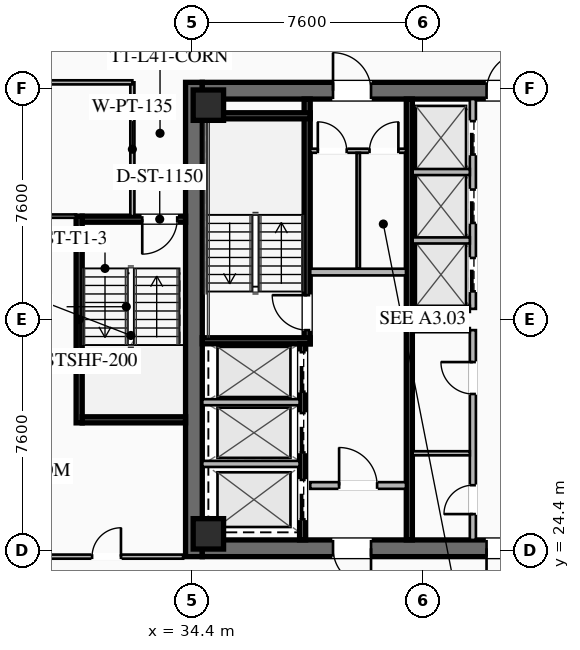
"""IFC4 building model, lengths in metres.
Left out: names, types, materials, properties, quantities, classifications, styles, units other than length and angle.
Written with IfcOpenShell. Run it as: python <this file> out.ifc"""

import sys

from ifc_helpers import new_model, si_unit, direction, frame, frame_2d, origin, origin_2d, place, context, subcontext, project, spatial, rectangle, hollow_rectangle, extrude, element, fill, save


model = new_model("IFC4")
c1 = context("Model", 3, precision=1e-05, world=origin(), true_north=direction((0.0, 1.0)))
c2 = subcontext(c1, "Body", "Model", "MODEL_VIEW")
j1 = project(units=[si_unit("LENGTHUNIT", "METRE"), si_unit("PLANEANGLEUNIT", "RADIAN")], contexts=[c1])
p1 = place(None, origin())
s1 = spatial("IfcSite", under=j1, at=p1, CompositionType="ELEMENT")
p2 = place(p1, origin())
s2 = spatial("IfcBuilding", under=s1, at=p2, CompositionType="ELEMENT")
p3 = place(p2, frame((0.0, 0.0, 153.45)))
s3 = spatial("IfcBuildingStorey", under=s2, at=p3, CompositionType="ELEMENT", Elevation=153.45)
p4 = place(p3, frame((34.475, 24.2, 0.0), z_axis=(0.0, 0.0, 1.0), x_axis=(0.0, 1.0, 0.0)))
e1 = element("IfcWall", 1, at=p4, inside=s3, PredefinedType="SHEAR", context=c2, shape_type="SweptSolid", body=[
    extrude(rectangle(XDim=15.6, YDim=0.55, at=frame_2d((7.8, 0.0))), origin(), (0.0, 0.0, 1.0), 3.55),
])
p5 = place(p3, frame((49.25, 24.475, 0.0), z_axis=(0.0, 0.0, 1.0), x_axis=(-1.0, 0.0, 0.0)))
e2 = element("IfcWall", 2, at=p5, inside=s3, PredefinedType="SHEAR", context=c2, shape_type="SweptSolid", body=[
    extrude(rectangle(XDim=14.5, YDim=0.55, at=frame_2d((7.25, 0.0))), origin(), (0.0, 0.0, 1.0), 3.55),
])
p6 = place(p5, frame((8.95, 0.0, 0.0)))
e3 = element("IfcOpeningElement", 3, at=p6, cuts=e2, PredefinedType="OPENING", context=c2, shape_type="SweptSolid", body=[
    extrude(rectangle(XDim=1.25, YDim=2.25, at=frame_2d((0.625, 1.125))), frame((0.0, 0.285, 0.0), z_axis=(0.0, -1.0, 0.0), x_axis=(1.0, 0.0, 0.0)), (0.0, 0.0, 1.0), 0.57),
])
p7 = place(p5, frame((3.9, 0.0, 0.0)))
e4 = element("IfcOpeningElement", 4, at=p7, cuts=e2, PredefinedType="OPENING", context=c2, shape_type="SweptSolid", body=[
    extrude(rectangle(XDim=1.25, YDim=2.25, at=frame_2d((0.625, 1.125))), frame((0.0, 0.285, 0.0), z_axis=(0.0, -1.0, 0.0), x_axis=(1.0, 0.0, 0.0)), (0.0, 0.0, 1.0), 0.57),
])
p8 = place(p3, frame((34.75, 39.525, 0.0), z_axis=(0.0, 0.0, 1.0), x_axis=(1.0, 0.0, 0.0)))
e5 = element("IfcWall", 5, at=p8, inside=s3, PredefinedType="SHEAR", context=c2, shape_type="SweptSolid", body=[
    extrude(rectangle(XDim=14.5, YDim=0.55, at=frame_2d((7.25, 0.0))), origin(), (0.0, 0.0, 1.0), 3.55),
])
p9 = place(p8, frame((4.3, 0.0, 0.0)))
e6 = element("IfcOpeningElement", 6, at=p9, cuts=e5, PredefinedType="OPENING", context=c2, shape_type="SweptSolid", body=[
    extrude(rectangle(XDim=1.25, YDim=2.25, at=frame_2d((0.625, 1.125))), frame((0.0, 0.285, 0.0), z_axis=(0.0, -1.0, 0.0), x_axis=(1.0, 0.0, 0.0)), (0.0, 0.0, 1.0), 0.57),
])
p10 = place(p8, frame((9.35, 0.0, 0.0)))
e7 = element("IfcOpeningElement", 7, at=p10, cuts=e5, PredefinedType="OPENING", context=c2, shape_type="SweptSolid", body=[
    extrude(rectangle(XDim=1.25, YDim=2.25, at=frame_2d((0.625, 1.125))), frame((0.0, 0.285, 0.0), z_axis=(0.0, -1.0, 0.0), x_axis=(1.0, 0.0, 0.0)), (0.0, 0.0, 1.0), 0.57),
])
for number, where, z_axis, x_axis in (
    (8, (34.95, 24.95, 0.0), (0.0, 0.0, 1.0), (1.0, 0.0, 0.0)),
    (9, (34.95, 39.05, 0.0), (0.0, 0.0, 1.0), (1.0, 0.0, 0.0)),
):
    element("IfcColumn", number, at=place(p3, frame(where, z_axis=z_axis, x_axis=x_axis)), inside=s3, PredefinedType="COLUMN", context=c2, shape_type="SweptSolid", body=[
        extrude(hollow_rectangle(XDim=1.0, YDim=1.0, WallThickness=0.04, at=origin_2d()), origin(), (0.0, 0.0, 1.0), 3.37),
    ])
p11 = place(p3, frame((38.2, 31.2, 0.0), z_axis=(0.0, 0.0, 1.0), x_axis=(0.0, 1.0, 0.0)))
e10 = element("IfcWall", 10, at=p11, inside=s3, PredefinedType="SHEAR", context=c2, shape_type="SweptSolid", body=[
    extrude(rectangle(XDim=8.05, YDim=0.2, at=frame_2d((4.025, 0.0))), origin(), (0.0, 0.0, 1.0), 3.37),
])
p12 = place(p11, frame((0.45, 0.0, 0.0)))
e11 = element("IfcOpeningElement", 11, at=p12, cuts=e10, PredefinedType="OPENING", context=c2, shape_type="SweptSolid", body=[
    extrude(rectangle(XDim=1.15, YDim=2.2, at=frame_2d((0.575, 1.1))), frame((0.0, 0.11, 0.0), z_axis=(0.0, -1.0, 0.0), x_axis=(1.0, 0.0, 0.0)), (0.0, 0.0, 1.0), 0.22),
])
for number, where, z_axis, x_axis in (
    (12, (34.75, 31.3, 0.0), (0.0, 0.0, 1.0), (1.0, 0.0, 0.0)),
    (13, (34.75, 38.7, 0.0), (0.0, 0.0, 1.0), (1.0, 0.0, 0.0)),
):
    element("IfcWall", number, at=place(p3, frame(where, z_axis=z_axis, x_axis=x_axis)), inside=s3, PredefinedType="SHEAR", context=c2, shape_type="SweptSolid", body=[
        extrude(rectangle(XDim=3.55, YDim=0.2, at=frame_2d((1.775, 0.0))), origin(), (0.0, 0.0, 1.0), 3.37),
    ])
p13 = place(p3, frame((41.56, 24.75, 0.0), z_axis=(0.0, 0.0, 1.0), x_axis=(0.0, 1.0, 0.0)))
e14 = element("IfcWall", 14, at=p13, inside=s3, PredefinedType="SHEAR", context=c2, shape_type="SweptSolid", body=[
    extrude(rectangle(XDim=14.5, YDim=0.2, at=frame_2d((7.25, 0.0))), origin(), (0.0, 0.0, 1.0), 3.37),
])
p14 = place(p3, frame((38.3, 33.56, 0.0), z_axis=(0.0, 0.0, 1.0), x_axis=(1.0, 0.0, 0.0)))
e15 = element("IfcWall", 15, at=p14, inside=s3, PredefinedType="SOLIDWALL", context=c2, shape_type="SweptSolid", body=[
    extrude(rectangle(XDim=3.15, YDim=0.22, at=frame_2d((1.575, 0.0))), origin(), (0.0, 0.0, 1.0), 2.513),
])
p15 = place(p3, frame((38.3, 26.54, 0.0), z_axis=(0.0, 0.0, 1.0), x_axis=(1.0, 0.0, 0.0)))
e16 = element("IfcWall", 16, at=p15, inside=s3, PredefinedType="SOLIDWALL", context=c2, shape_type="SweptSolid", body=[
    extrude(rectangle(XDim=3.15, YDim=0.22, at=frame_2d((1.575, 0.0))), origin(), (0.0, 0.0, 1.0), 2.513),
])
p16 = place(p15, frame((0.95, 0.0, 0.0)))
e17 = element("IfcOpeningElement", 17, at=p16, cuts=e16, PredefinedType="OPENING", context=c2, shape_type="SweptSolid", body=[
    extrude(rectangle(XDim=1.25, YDim=2.25, at=frame_2d((0.625, 1.125))), frame((0.0, 0.12, 0.0), z_axis=(0.0, -1.0, 0.0), x_axis=(1.0, 0.0, 0.0)), (0.0, 0.0, 1.0), 0.24),
])
p17 = place(p3, frame((38.05, 24.75, 0.0), z_axis=(0.0, 0.0, 1.0), x_axis=(0.0, 1.0, 0.0)))
e18 = element("IfcWall", 18, at=p17, inside=s3, PredefinedType="SHEAR", context=c2, shape_type="SweptSolid", body=[
    extrude(rectangle(XDim=6.45, YDim=0.2, at=frame_2d((3.225, 0.0))), origin(), (0.0, 0.0, 1.0), 3.37),
])
p18 = place(p17, frame((4.875, 0.0, 0.0)))
e19 = element("IfcOpeningElement", 19, at=p18, cuts=e18, PredefinedType="OPENING", context=c2, shape_type="SweptSolid", body=[
    extrude(rectangle(XDim=1.3, YDim=2.25, at=frame_2d((0.65, 1.125))), frame((0.0, 0.11, 0.0), z_axis=(0.0, -1.0, 0.0), x_axis=(1.0, 0.0, 0.0)), (0.0, 0.0, 1.0), 0.22),
])
p19 = place(p17, frame((2.875, 0.0, 0.0)))
e20 = element("IfcOpeningElement", 20, at=p19, cuts=e18, PredefinedType="OPENING", context=c2, shape_type="SweptSolid", body=[
    extrude(rectangle(XDim=1.3, YDim=2.25, at=frame_2d((0.65, 1.125))), frame((0.0, 0.11, 0.0), z_axis=(0.0, -1.0, 0.0), x_axis=(1.0, 0.0, 0.0)), (0.0, 0.0, 1.0), 0.22),
])
p20 = place(p17, frame((0.675, 0.0, 0.0)))
e21 = element("IfcOpeningElement", 21, at=p20, cuts=e18, PredefinedType="OPENING", context=c2, shape_type="SweptSolid", body=[
    extrude(rectangle(XDim=1.3, YDim=2.25, at=frame_2d((0.65, 1.125))), frame((0.0, 0.11, 0.0), z_axis=(0.0, -1.0, 0.0), x_axis=(1.0, 0.0, 0.0)), (0.0, 0.0, 1.0), 0.22),
])
for number, where, z_axis, x_axis in (
    (22, (34.75, 27.25, 0.0), (0.0, 0.0, 1.0), (1.0, 0.0, 0.0)),
    (23, (34.75, 29.28, 0.0), (0.0, 0.0, 1.0), (1.0, 0.0, 0.0)),
):
    element("IfcWall", number, at=place(p3, frame(where, z_axis=z_axis, x_axis=x_axis)), inside=s3, PredefinedType="SOLIDWALL", context=c2, shape_type="SweptSolid", body=[
        extrude(rectangle(XDim=3.2, YDim=0.2, at=frame_2d((1.6, 0.0))), origin(), (0.0, 0.0, 1.0), 3.37),
    ])
p21 = place(p3, frame((38.3, 37.55, 0.0), z_axis=(0.0, 0.0, 1.0), x_axis=(1.0, 0.0, 0.0)))
e24 = element("IfcWall", 24, at=p21, inside=s3, PredefinedType="PARTITIONING", context=c2, shape_type="SweptSolid", body=[
    extrude(rectangle(XDim=3.15, YDim=0.135, at=frame_2d((1.575, 0.0))), origin(), (0.0, 0.0, 1.0), 2.513),
])
p22 = place(p21, frame((0.25, 0.0, 0.0)))
e25 = element("IfcOpeningElement", 25, at=p22, cuts=e24, PredefinedType="OPENING", context=c2, shape_type="SweptSolid", body=[
    extrude(rectangle(XDim=0.95, YDim=2.05, at=frame_2d((0.475, 1.025))), frame((0.0, 0.077, 0.0), z_axis=(0.0, -1.0, 0.0), x_axis=(1.0, 0.0, 0.0)), (0.0, 0.0, 1.0), 0.155),
])
p23 = place(p21, frame((1.95, 0.0, 0.0)))
e26 = element("IfcOpeningElement", 26, at=p23, cuts=e24, PredefinedType="OPENING", context=c2, shape_type="SweptSolid", body=[
    extrude(rectangle(XDim=0.95, YDim=2.05, at=frame_2d((0.475, 1.025))), frame((0.0, 0.077, 0.0), z_axis=(0.0, -1.0, 0.0), x_axis=(1.0, 0.0, 0.0)), (0.0, 0.0, 1.0), 0.155),
])
p24 = place(p3, frame((39.88, 33.68, 0.0), z_axis=(0.0, 0.0, 1.0), x_axis=(0.0, 1.0, 0.0)))
e27 = element("IfcWall", 27, at=p24, inside=s3, PredefinedType="PARTITIONING", context=c2, shape_type="SweptSolid", body=[
    extrude(rectangle(XDim=3.8, YDim=0.11, at=frame_2d((1.9, 0.0))), origin(), (0.0, 0.0, 1.0), 2.513),
])
p25 = place(p3, frame((43.65, 24.75, 0.0), z_axis=(0.0, 0.0, 1.0), x_axis=(0.0, 1.0, 0.0)))
e28 = element("IfcWall", 28, at=p25, inside=s3, PredefinedType="SOLIDWALL", context=c2, shape_type="SweptSolid", body=[
    extrude(rectangle(XDim=6.9, YDim=0.2, at=frame_2d((3.45, 0.0))), origin(), (0.0, 0.0, 1.0), 2.513),
])
p26 = place(p25, frame((0.85, 0.0, 0.0)))
e29 = element("IfcOpeningElement", 29, at=p26, cuts=e28, PredefinedType="OPENING", context=c2, shape_type="SweptSolid", body=[
    extrude(rectangle(XDim=0.95, YDim=2.05, at=frame_2d((0.475, 1.025))), frame((0.0, 0.11, 0.0), z_axis=(0.0, -1.0, 0.0), x_axis=(1.0, 0.0, 0.0)), (0.0, 0.0, 1.0), 0.22),
])
p27 = place(p25, frame((4.8, 0.0, 0.0)))
e30 = element("IfcOpeningElement", 30, at=p27, cuts=e28, PredefinedType="OPENING", context=c2, shape_type="SweptSolid", body=[
    extrude(rectangle(XDim=1.05, YDim=2.2, at=frame_2d((0.525, 1.1))), frame((0.0, 0.11, 0.0), z_axis=(0.0, -1.0, 0.0), x_axis=(1.0, 0.0, 0.0)), (0.0, 0.0, 1.0), 0.22),
])
for number, where, z_axis, x_axis in (
    (31, (41.67, 31.65, 0.0), (0.0, 0.0, 1.0), (1.0, 0.0, 0.0)),
    (32, (41.67, 27.6, 0.0), (0.0, 0.0, 1.0), (1.0, 0.0, 0.0)),
):
    element("IfcWall", number, at=place(p3, frame(where, z_axis=z_axis, x_axis=x_axis)), inside=s3, PredefinedType="PARTITIONING", context=c2, shape_type="SweptSolid", body=[
        extrude(rectangle(XDim=1.88, YDim=0.135, at=frame_2d((0.94, 0.0))), origin(), (0.0, 0.0, 1.0), 2.513),
    ])
p28 = place(p3, frame((43.65, 32.35, 0.0), z_axis=(0.0, 0.0, 1.0), x_axis=(0.0, 1.0, 0.0)))
e33 = element("IfcWall", 33, at=p28, inside=s3, PredefinedType="SOLIDWALL", context=c2, shape_type="SweptSolid", body=[
    extrude(rectangle(XDim=6.9, YDim=0.2, at=frame_2d((3.45, 0.0))), origin(), (0.0, 0.0, 1.0), 3.37),
])
p29 = place(p28, frame((0.575, 0.0, 0.0)))
e34 = element("IfcOpeningElement", 34, at=p29, cuts=e33, PredefinedType="OPENING", context=c2, shape_type="SweptSolid", body=[
    extrude(rectangle(XDim=1.1, YDim=2.2, at=frame_2d((0.55, 1.1))), frame((0.0, 0.11, 0.0), z_axis=(0.0, -1.0, 0.0), x_axis=(1.0, 0.0, 0.0)), (0.0, 0.0, 1.0), 0.22),
])
p30 = place(p28, frame((2.825, 0.0, 0.0)))
e35 = element("IfcOpeningElement", 35, at=p30, cuts=e33, PredefinedType="OPENING", context=c2, shape_type="SweptSolid", body=[
    extrude(rectangle(XDim=1.1, YDim=2.2, at=frame_2d((0.55, 1.1))), frame((0.0, 0.11, 0.0), z_axis=(0.0, -1.0, 0.0), x_axis=(1.0, 0.0, 0.0)), (0.0, 0.0, 1.0), 0.22),
])
p31 = place(p28, frame((5.075, 0.0, 0.0)))
e36 = element("IfcOpeningElement", 36, at=p31, cuts=e33, PredefinedType="OPENING", context=c2, shape_type="SweptSolid", body=[
    extrude(rectangle(XDim=1.1, YDim=2.2, at=frame_2d((0.55, 1.1))), frame((0.0, 0.11, 0.0), z_axis=(0.0, -1.0, 0.0), x_axis=(1.0, 0.0, 0.0)), (0.0, 0.0, 1.0), 0.22),
])
for number, where, z_axis, x_axis in (
    (37, (41.67, 32.35, 0.0), (0.0, 0.0, 1.0), (1.0, 0.0, 0.0)),
    (38, (41.67, 34.6, 0.0), (0.0, 0.0, 1.0), (1.0, 0.0, 0.0)),
    (39, (41.67, 36.85, 0.0), (0.0, 0.0, 1.0), (1.0, 0.0, 0.0)),
):
    element("IfcWall", number, at=place(p3, frame(where, z_axis=z_axis, x_axis=x_axis)), inside=s3, PredefinedType="SOLIDWALL", context=c2, shape_type="SweptSolid", body=[
        extrude(rectangle(XDim=1.88, YDim=0.2, at=frame_2d((0.94, 0.0))), origin(), (0.0, 0.0, 1.0), 3.37),
    ])
p32 = place(p3, frame((30.7, 28.6, 0.0), z_axis=(0.0, 0.0, 1.0), x_axis=(0.0, 1.0, 0.0)))
e40 = element("IfcWall", 40, at=p32, inside=s3, PredefinedType="SHEAR", context=c2, shape_type="SweptSolid", body=[
    extrude(rectangle(XDim=6.8, YDim=0.2, at=frame_2d((3.4, 0.0))), origin(), (0.0, 0.0, 1.0), 3.37),
])
p33 = place(p3, frame((34.2, 35.3, 0.0), z_axis=(0.0, 0.0, 1.0), x_axis=(-1.0, 0.0, 0.0)))
e41 = element("IfcWall", 41, at=p33, inside=s3, PredefinedType="SHEAR", context=c2, shape_type="SweptSolid", body=[
    extrude(rectangle(XDim=3.4, YDim=0.2, at=frame_2d((1.7, 0.0))), origin(), (0.0, 0.0, 1.0), 3.37),
])
p34 = place(p33, frame((0.275, 0.0, 0.0)))
e42 = element("IfcOpeningElement", 42, at=p34, cuts=e41, PredefinedType="OPENING", context=c2, shape_type="SweptSolid", body=[
    extrude(rectangle(XDim=1.15, YDim=2.2, at=frame_2d((0.575, 1.1))), frame((0.0, 0.11, 0.0), z_axis=(0.0, -1.0, 0.0), x_axis=(1.0, 0.0, 0.0)), (0.0, 0.0, 1.0), 0.22),
])
p35 = place(p3, frame((30.8, 28.7, 0.0), z_axis=(0.0, 0.0, 1.0), x_axis=(1.0, 0.0, 0.0)))
e43 = element("IfcWall", 43, at=p35, inside=s3, PredefinedType="SHEAR", context=c2, shape_type="SweptSolid", body=[
    extrude(rectangle(XDim=3.4, YDim=0.2, at=frame_2d((1.7, 0.0))), origin(), (0.0, 0.0, 1.0), 3.37),
])
p36 = place(p3, frame((32.45, 35.4, 0.0), z_axis=(0.0, 0.0, 1.0), x_axis=(0.0, 1.0, 0.0)))
e44 = element("IfcWall", 44, at=p36, inside=s3, PredefinedType="PARTITIONING", context=c2, shape_type="SweptSolid", body=[
    extrude(rectangle(XDim=4.4, YDim=0.135, at=frame_2d((2.2, 0.0))), origin(), (0.0, 0.0, 1.0), 2.513),
])
p37 = place(p3, frame((32.45, 39.8, 0.0), z_axis=(0.0, 0.0, 1.0), x_axis=(-1.0, 0.0, 0.0)))
e45 = element("IfcWall", 45, at=p37, inside=s3, PredefinedType="PARTITIONING", context=c2, shape_type="SweptSolid", body=[
    extrude(rectangle(XDim=9.73, YDim=0.135, at=frame_2d((4.865, 0.0))), origin(), (0.0, 0.0, 1.0), 2.513),
])
p38 = place(p37, frame((4.04, 0.0, 0.0)))
e46 = element("IfcOpeningElement", 46, at=p38, cuts=e45, PredefinedType="OPENING", context=c2, shape_type="SweptSolid", body=[
    extrude(rectangle(XDim=0.95, YDim=2.05, at=frame_2d((0.475, 1.025))), frame((0.0, 0.077, 0.0), z_axis=(0.0, -1.0, 0.0), x_axis=(1.0, 0.0, 0.0)), (0.0, 0.0, 1.0), 0.155),
])
p39 = place(p3, frame((22.72, 24.2, 0.0), z_axis=(0.0, 0.0, 1.0), x_axis=(1.0, 0.0, 0.0)))
e47 = element("IfcWall", 47, at=p39, inside=s3, PredefinedType="PARTITIONING", context=c2, shape_type="SweptSolid", body=[
    extrude(rectangle(XDim=11.4, YDim=0.135, at=frame_2d((5.7, 0.0))), origin(), (0.0, 0.0, 1.0), 2.513),
])
p40 = place(p39, frame((8.405, 0.0, 0.0)))
e48 = element("IfcOpeningElement", 48, at=p40, cuts=e47, PredefinedType="OPENING", context=c2, shape_type="SweptSolid", body=[
    extrude(rectangle(XDim=0.95, YDim=2.05, at=frame_2d((0.475, 1.025))), frame((0.0, 0.077, 0.0), z_axis=(0.0, -1.0, 0.0), x_axis=(1.0, 0.0, 0.0)), (0.0, 0.0, 1.0), 0.155),
])
p41 = place(p3, frame((30.6, 35.4, 0.0), z_axis=(0.0, 0.0, 1.0), x_axis=(-1.0, 0.0, 0.0)))
e49 = element("IfcWall", 49, at=p41, inside=s3, PredefinedType="PARTITIONING", context=c2, shape_type="SweptSolid", body=[
    extrude(rectangle(XDim=7.88, YDim=0.11, at=frame_2d((3.94, 0.0))), origin(), (0.0, 0.0, 1.0), 2.513),
])
p42 = place(p9, origin())
e50 = element("IfcDoor", 50, at=p42, inside=s3, OperationType="SINGLE_SWING_LEFT", PredefinedType="DOOR", context=c2, shape_type="SweptSolid", body=[
    extrude(rectangle(XDim=1.25, YDim=2.25, at=frame_2d((0.625, 1.125))), frame((0.0, 0.025, 0.0), z_axis=(0.0, -1.0, 0.0), x_axis=(1.0, 0.0, 0.0)), (0.0, 0.0, 1.0), 0.05),
])
fill(e6, e50)
p43 = place(p10, origin())
e51 = element("IfcDoor", 51, at=p43, inside=s3, OperationType="SINGLE_SWING_RIGHT", PredefinedType="DOOR", context=c2, shape_type="SweptSolid", body=[
    extrude(rectangle(XDim=1.25, YDim=2.25, at=frame_2d((0.625, 1.125))), frame((0.0, 0.025, 0.0), z_axis=(0.0, -1.0, 0.0), x_axis=(1.0, 0.0, 0.0)), (0.0, 0.0, 1.0), 0.05),
])
fill(e7, e51)
p44 = place(p6, origin())
e52 = element("IfcDoor", 52, at=p44, inside=s3, OperationType="SINGLE_SWING_LEFT", PredefinedType="DOOR", context=c2, shape_type="SweptSolid", body=[
    extrude(rectangle(XDim=1.25, YDim=2.25, at=frame_2d((0.625, 1.125))), frame((0.0, 0.025, 0.0), z_axis=(0.0, -1.0, 0.0), x_axis=(1.0, 0.0, 0.0)), (0.0, 0.0, 1.0), 0.05),
])
fill(e3, e52)
p45 = place(p7, origin())
e53 = element("IfcDoor", 53, at=p45, inside=s3, OperationType="SINGLE_SWING_RIGHT", PredefinedType="DOOR", context=c2, shape_type="SweptSolid", body=[
    extrude(rectangle(XDim=1.25, YDim=2.25, at=frame_2d((0.625, 1.125))), frame((0.0, 0.025, 0.0), z_axis=(0.0, -1.0, 0.0), x_axis=(1.0, 0.0, 0.0)), (0.0, 0.0, 1.0), 0.05),
])
fill(e4, e53)
p46 = place(p12, origin())
e54 = element("IfcDoor", 54, at=p46, inside=s3, OperationType="SINGLE_SWING_RIGHT", PredefinedType="DOOR", context=c2, shape_type="SweptSolid", body=[
    extrude(rectangle(XDim=1.15, YDim=2.2, at=frame_2d((0.575, 1.1))), frame((0.0, 0.025, 0.0), z_axis=(0.0, -1.0, 0.0), x_axis=(1.0, 0.0, 0.0)), (0.0, 0.0, 1.0), 0.05),
])
fill(e11, e54)
p47 = place(p16, origin())
e55 = element("IfcDoor", 55, at=p47, inside=s3, OperationType="SINGLE_SWING_LEFT", PredefinedType="DOOR", context=c2, shape_type="SweptSolid", body=[
    extrude(rectangle(XDim=1.25, YDim=2.25, at=frame_2d((0.625, 1.125))), frame((0.0, 0.025, 0.0), z_axis=(0.0, -1.0, 0.0), x_axis=(1.0, 0.0, 0.0)), (0.0, 0.0, 1.0), 0.05),
])
fill(e17, e55)
p48 = place(p22, origin())
e56 = element("IfcDoor", 56, at=p48, inside=s3, OperationType="SINGLE_SWING_LEFT", PredefinedType="DOOR", context=c2, shape_type="SweptSolid", body=[
    extrude(rectangle(XDim=0.95, YDim=2.05, at=frame_2d((0.475, 1.025))), frame((0.0, 0.025, 0.0), z_axis=(0.0, -1.0, 0.0), x_axis=(1.0, 0.0, 0.0)), (0.0, 0.0, 1.0), 0.05),
])
fill(e25, e56)
p49 = place(p23, origin())
e57 = element("IfcDoor", 57, at=p49, inside=s3, OperationType="SINGLE_SWING_RIGHT", PredefinedType="DOOR", context=c2, shape_type="SweptSolid", body=[
    extrude(rectangle(XDim=0.95, YDim=2.05, at=frame_2d((0.475, 1.025))), frame((0.0, 0.025, 0.0), z_axis=(0.0, -1.0, 0.0), x_axis=(1.0, 0.0, 0.0)), (0.0, 0.0, 1.0), 0.05),
])
fill(e26, e57)
p50 = place(p26, origin())
e58 = element("IfcDoor", 58, at=p50, inside=s3, OperationType="SINGLE_SWING_LEFT", PredefinedType="DOOR", context=c2, shape_type="SweptSolid", body=[
    extrude(rectangle(XDim=0.95, YDim=2.05, at=frame_2d((0.475, 1.025))), frame((0.0, 0.025, 0.0), z_axis=(0.0, -1.0, 0.0), x_axis=(1.0, 0.0, 0.0)), (0.0, 0.0, 1.0), 0.05),
])
fill(e29, e58)
p51 = place(p27, origin())
e59 = element("IfcDoor", 59, at=p51, inside=s3, OperationType="SINGLE_SWING_RIGHT", PredefinedType="DOOR", context=c2, shape_type="SweptSolid", body=[
    extrude(rectangle(XDim=1.05, YDim=2.2, at=frame_2d((0.525, 1.1))), frame((0.0, 0.025, 0.0), z_axis=(0.0, -1.0, 0.0), x_axis=(1.0, 0.0, 0.0)), (0.0, 0.0, 1.0), 0.05),
])
fill(e30, e59)
p52 = place(p34, origin())
e60 = element("IfcDoor", 60, at=p52, inside=s3, OperationType="SINGLE_SWING_RIGHT", PredefinedType="DOOR", context=c2, shape_type="SweptSolid", body=[
    extrude(rectangle(XDim=1.15, YDim=2.2, at=frame_2d((0.575, 1.1))), frame((0.0, 0.025, 0.0), z_axis=(0.0, -1.0, 0.0), x_axis=(1.0, 0.0, 0.0)), (0.0, 0.0, 1.0), 0.05),
])
fill(e42, e60)
p53 = place(p40, origin())
e61 = element("IfcDoor", 61, at=p53, inside=s3, OperationType="SINGLE_SWING_RIGHT", PredefinedType="DOOR", context=c2, shape_type="SweptSolid", body=[
    extrude(rectangle(XDim=0.95, YDim=2.05, at=frame_2d((0.475, 1.025))), frame((0.0, 0.025, 0.0), z_axis=(0.0, -1.0, 0.0), x_axis=(1.0, 0.0, 0.0)), (0.0, 0.0, 1.0), 0.05),
])
fill(e48, e61)
p54 = place(p18, origin())
e62 = element("IfcDoor", 62, at=p54, inside=s3, OperationType="SLIDING_TO_LEFT", PredefinedType="DOOR", context=c2, shape_type="SweptSolid", body=[
    extrude(rectangle(XDim=1.3, YDim=2.25, at=frame_2d((0.65, 1.125))), frame((0.0, 0.025, 0.0), z_axis=(0.0, -1.0, 0.0), x_axis=(1.0, 0.0, 0.0)), (0.0, 0.0, 1.0), 0.05),
])
fill(e19, e62)
p55 = place(p19, origin())
e63 = element("IfcDoor", 63, at=p55, inside=s3, OperationType="SLIDING_TO_LEFT", PredefinedType="DOOR", context=c2, shape_type="SweptSolid", body=[
    extrude(rectangle(XDim=1.3, YDim=2.25, at=frame_2d((0.65, 1.125))), frame((0.0, 0.025, 0.0), z_axis=(0.0, -1.0, 0.0), x_axis=(1.0, 0.0, 0.0)), (0.0, 0.0, 1.0), 0.05),
])
fill(e20, e63)
p56 = place(p20, origin())
e64 = element("IfcDoor", 64, at=p56, inside=s3, OperationType="SLIDING_TO_LEFT", PredefinedType="DOOR", context=c2, shape_type="SweptSolid", body=[
    extrude(rectangle(XDim=1.3, YDim=2.25, at=frame_2d((0.65, 1.125))), frame((0.0, 0.025, 0.0), z_axis=(0.0, -1.0, 0.0), x_axis=(1.0, 0.0, 0.0)), (0.0, 0.0, 1.0), 0.05),
])
fill(e21, e64)
p57 = place(p29, origin())
e65 = element("IfcDoor", 65, at=p57, inside=s3, OperationType="SLIDING_TO_LEFT", PredefinedType="DOOR", context=c2, shape_type="SweptSolid", body=[
    extrude(rectangle(XDim=1.1, YDim=2.2, at=frame_2d((0.55, 1.1))), frame((0.0, 0.025, 0.0), z_axis=(0.0, -1.0, 0.0), x_axis=(1.0, 0.0, 0.0)), (0.0, 0.0, 1.0), 0.05),
])
fill(e34, e65)
p58 = place(p30, origin())
e66 = element("IfcDoor", 66, at=p58, inside=s3, OperationType="SLIDING_TO_LEFT", PredefinedType="DOOR", context=c2, shape_type="SweptSolid", body=[
    extrude(rectangle(XDim=1.1, YDim=2.2, at=frame_2d((0.55, 1.1))), frame((0.0, 0.025, 0.0), z_axis=(0.0, -1.0, 0.0), x_axis=(1.0, 0.0, 0.0)), (0.0, 0.0, 1.0), 0.05),
])
fill(e35, e66)
p59 = place(p31, origin())
e67 = element("IfcDoor", 67, at=p59, inside=s3, OperationType="SLIDING_TO_LEFT", PredefinedType="DOOR", context=c2, shape_type="SweptSolid", body=[
    extrude(rectangle(XDim=1.1, YDim=2.2, at=frame_2d((0.55, 1.1))), frame((0.0, 0.025, 0.0), z_axis=(0.0, -1.0, 0.0), x_axis=(1.0, 0.0, 0.0)), (0.0, 0.0, 1.0), 0.05),
])
fill(e36, e67)
save(model, sys.argv[1])
